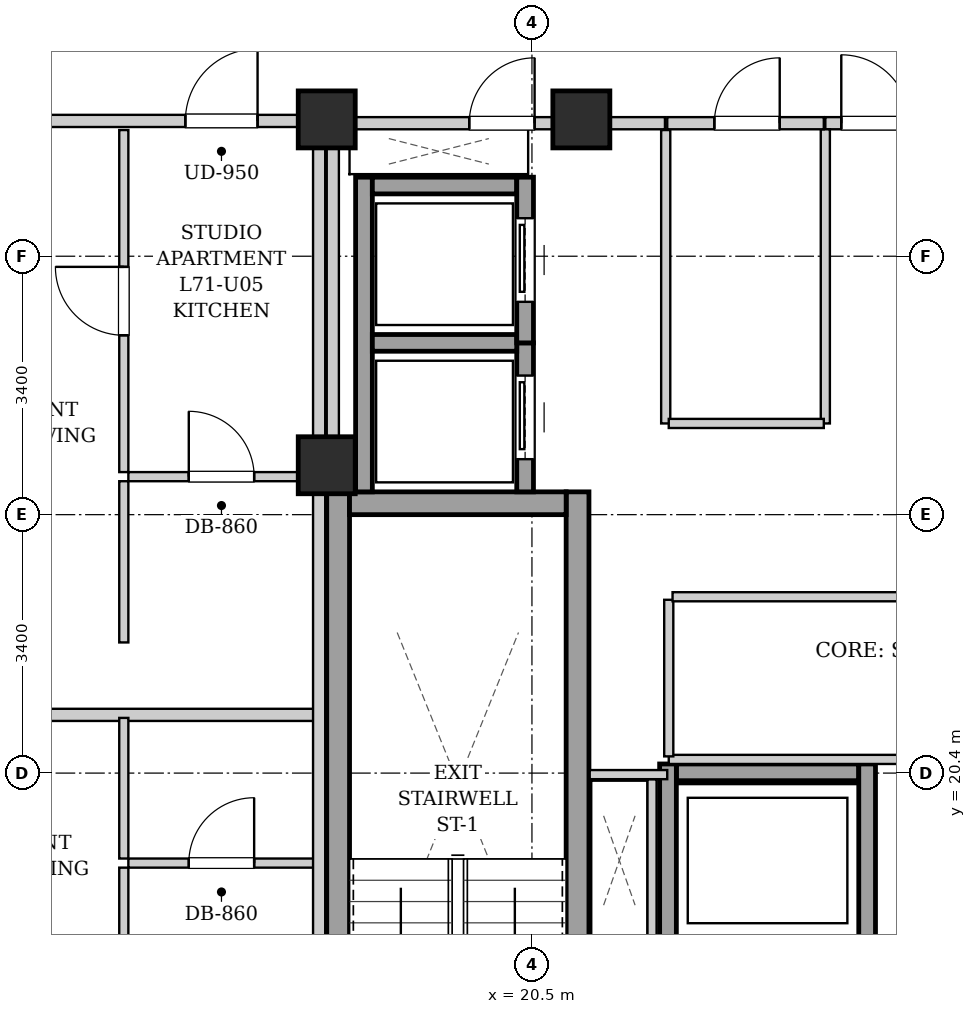
"""IFC4 building model, lengths in metres.
Left out: names, types, materials, properties, quantities, classifications, styles, units other than length and angle.
Written with IfcOpenShell. Run it as: python <this file> out.ifc"""

import sys

from ifc_helpers import new_model, si_unit, direction, frame, frame_2d, origin, origin_2d, place, context, subcontext, project, spatial, rectangle, extrude, element, fill, save


model = new_model("IFC4")
c1 = context("Model", 3, precision=1e-05, world=origin(), true_north=direction((0.0, 1.0)))
c2 = subcontext(c1, "Body", "Model", "MODEL_VIEW")
j1 = project(units=[si_unit("LENGTHUNIT", "METRE"), si_unit("PLANEANGLEUNIT", "RADIAN")], contexts=[c1])
p1 = place(None, origin())
s1 = spatial("IfcSite", under=j1, at=p1, CompositionType="ELEMENT")
p2 = place(p1, origin())
s2 = spatial("IfcBuilding", under=s1, at=p2, CompositionType="ELEMENT")
p3 = place(p2, frame((0.0, 0.0, 244.5)))
s3 = spatial("IfcBuildingStorey", under=s2, at=p3, CompositionType="ELEMENT", Elevation=244.5)
for number, where, z_axis, x_axis in (
    (1, (17.8, 29.0, 0.0), (0.0, 0.0, 1.0), (1.0, 0.0, 0.0)),
    (2, (21.15, 29.0, 0.0), (0.0, 0.0, 1.0), (1.0, 0.0, 0.0)),
    (3, (17.8, 24.45, 0.0), (0.0, 0.0, 1.0), (1.0, 0.0, 0.0)),
):
    element("IfcColumn", number, at=place(p3, frame(where, z_axis=z_axis, x_axis=x_axis)), inside=s3, PredefinedType="COLUMN", context=c2, shape_type="SweptSolid", body=[
        extrude(rectangle(XDim=0.75, YDim=0.75, at=origin_2d()), origin(), (0.0, 0.0, 1.0), 3.4),
    ])
for number, where, z_axis, x_axis in (
    (4, (17.95, 15.1, 0.0), (0.0, 0.0, 1.0), (0.0, 1.0, 0.0)),
    (5, (21.1, 15.1, 0.0), (0.0, 0.0, 1.0), (0.0, 1.0, 0.0)),
):
    element("IfcWall", number, at=place(p3, frame(where, z_axis=z_axis, x_axis=x_axis)), inside=s3, PredefinedType="SHEAR", context=c2, shape_type="SweptSolid", body=[
        extrude(rectangle(XDim=9.0, YDim=0.3, at=frame_2d((4.5, 0.0))), origin(), (0.0, 0.0, 1.0), 3.14),
    ])
p4 = place(p3, frame((18.1, 23.95, 0.0), z_axis=(0.0, 0.0, 1.0), x_axis=(1.0, 0.0, 0.0)))
e6 = element("IfcWall", 6, at=p4, inside=s3, PredefinedType="SHEAR", context=c2, shape_type="SweptSolid", body=[
    extrude(rectangle(XDim=2.85, YDim=0.3, at=frame_2d((1.425, 0.0))), origin(), (0.0, 0.0, 1.0), 3.14),
])
p5 = place(p3, frame((18.29, 24.1, 0.0), z_axis=(0.0, 0.0, 1.0), x_axis=(0.0, 1.0, 0.0)))
e7 = element("IfcWall", 7, at=p5, inside=s3, PredefinedType="SHEAR", context=c2, shape_type="SweptSolid", body=[
    extrude(rectangle(XDim=4.14, YDim=0.22, at=frame_2d((2.07, 0.0))), origin(), (0.0, 0.0, 1.0), 3.14),
])
p6 = place(p3, frame((20.41, 24.1, 0.0), z_axis=(0.0, 0.0, 1.0), x_axis=(0.0, 1.0, 0.0)))
e8 = element("IfcWall", 8, at=p6, inside=s3, PredefinedType="SHEAR", context=c2, shape_type="SweptSolid", body=[
    extrude(rectangle(XDim=1.96, YDim=0.22, at=frame_2d((0.98, 0.0))), origin(), (0.0, 0.0, 1.0), 3.14),
])
p7 = place(p6, frame((0.43, 0.0, 0.0)))
e9 = element("IfcOpeningElement", 9, at=p7, cuts=e8, PredefinedType="OPENING", context=c2, shape_type="SweptSolid", body=[
    extrude(rectangle(XDim=1.1, YDim=2.15, at=frame_2d((0.55, 1.075))), frame((0.0, 0.12, 0.0), z_axis=(0.0, -1.0, 0.0), x_axis=(1.0, 0.0, 0.0)), (0.0, 0.0, 1.0), 0.24),
])
for number, where, z_axis, x_axis in (
    (10, (18.4, 26.06, 0.0), (0.0, 0.0, 1.0), (1.0, 0.0, 0.0)),
    (11, (18.4, 28.13, 0.0), (0.0, 0.0, 1.0), (1.0, 0.0, 0.0)),
):
    element("IfcWall", number, at=place(p3, frame(where, z_axis=z_axis, x_axis=x_axis)), inside=s3, PredefinedType="SHEAR", context=c2, shape_type="SweptSolid", body=[
        extrude(rectangle(XDim=1.9, YDim=0.22, at=frame_2d((0.95, 0.0))), origin(), (0.0, 0.0, 1.0), 3.14),
    ])
p8 = place(p3, frame((20.41, 26.06, 0.0), z_axis=(0.0, 0.0, 1.0), x_axis=(0.0, 1.0, 0.0)))
e12 = element("IfcWall", 12, at=p8, inside=s3, PredefinedType="SHEAR", context=c2, shape_type="SweptSolid", body=[
    extrude(rectangle(XDim=2.18, YDim=0.22, at=frame_2d((1.09, 0.0))), origin(), (0.0, 0.0, 1.0), 3.14),
])
p9 = place(p8, frame((0.54, 0.0, 0.0)))
e13 = element("IfcOpeningElement", 13, at=p9, cuts=e12, PredefinedType="OPENING", context=c2, shape_type="SweptSolid", body=[
    extrude(rectangle(XDim=1.1, YDim=2.15, at=frame_2d((0.55, 1.075))), frame((0.0, 0.12, 0.0), z_axis=(0.0, -1.0, 0.0), x_axis=(1.0, 0.0, 0.0)), (0.0, 0.0, 1.0), 0.24),
])
p10 = place(p3, frame((22.4, 20.41, 0.0), z_axis=(0.0, 0.0, 1.0), x_axis=(1.0, 0.0, 0.0)))
e14 = element("IfcWall", 14, at=p10, inside=s3, PredefinedType="SHEAR", context=c2, shape_type="SweptSolid", body=[
    extrude(rectangle(XDim=2.4, YDim=0.22, at=frame_2d((1.2, 0.0))), origin(), (0.0, 0.0, 1.0), 3.14),
])
for number, where, z_axis, x_axis in (
    (15, (22.29, 17.98, 0.0), (0.0, 0.0, 1.0), (0.0, 1.0, 0.0)),
    (16, (24.91, 17.98, 0.0), (0.0, 0.0, 1.0), (0.0, 1.0, 0.0)),
):
    element("IfcWall", number, at=place(p3, frame(where, z_axis=z_axis, x_axis=x_axis)), inside=s3, PredefinedType="SHEAR", context=c2, shape_type="SweptSolid", body=[
        extrude(rectangle(XDim=2.54, YDim=0.22, at=frame_2d((1.27, 0.0))), origin(), (0.0, 0.0, 1.0), 3.14),
    ])
p11 = place(p3, frame((17.88, 24.12, 0.0), z_axis=(0.0, 0.0, 1.0), x_axis=(0.0, 1.0, 0.0)))
e17 = element("IfcWall", 17, at=p11, inside=s3, PredefinedType="PARTITIONING", context=c2, shape_type="SweptSolid", body=[
    extrude(rectangle(XDim=4.76, YDim=0.16, at=frame_2d((2.38, 0.0))), origin(), (0.0, 0.0, 1.0), 3.14),
])
p12 = place(p3, frame((24.36, 28.95, 0.0), z_axis=(0.0, 0.0, 1.0), x_axis=(1.0, 0.0, 0.0)))
e18 = element("IfcWall", 18, at=p12, inside=s3, PredefinedType="PARTITIONING", context=c2, shape_type="SweptSolid", body=[
    extrude(rectangle(XDim=1.32, YDim=0.16, at=frame_2d((0.66, 0.0))), origin(), (0.0, 0.0, 1.0), 2.668),
])
p13 = place(p12, frame((0.21, 0.0, 0.0)))
e19 = element("IfcOpeningElement", 19, at=p13, cuts=e18, PredefinedType="OPENING", context=c2, shape_type="SweptSolid", body=[
    extrude(rectangle(XDim=0.9, YDim=2.05, at=frame_2d((0.45, 1.025))), frame((0.0, 0.09, 0.0), z_axis=(0.0, -1.0, 0.0), x_axis=(1.0, 0.0, 0.0)), (0.0, 0.0, 1.0), 0.18),
])
p14 = place(p3, frame((17.96, 28.95, 0.0), z_axis=(0.0, 0.0, 1.0), x_axis=(1.0, 0.0, 0.0)))
e20 = element("IfcWall", 20, at=p14, inside=s3, PredefinedType="PARTITIONING", context=c2, shape_type="SweptSolid", body=[
    extrude(rectangle(XDim=4.29, YDim=0.16, at=frame_2d((2.145, 0.0))), origin(), (0.0, 0.0, 1.0), 2.668),
])
p15 = place(p14, frame((1.715, 0.0, 0.0)))
e21 = element("IfcOpeningElement", 21, at=p15, cuts=e20, PredefinedType="OPENING", context=c2, shape_type="SweptSolid", body=[
    extrude(rectangle(XDim=0.86, YDim=2.05, at=frame_2d((0.43, 1.025))), frame((0.0, 0.09, 0.0), z_axis=(0.0, -1.0, 0.0), x_axis=(1.0, 0.0, 0.0)), (0.0, 0.0, 1.0), 0.18),
])
p16 = place(p3, frame((22.08, 18.2, 0.0), z_axis=(0.0, 0.0, 1.0), x_axis=(0.0, 1.0, 0.0)))
e22 = element("IfcWall", 22, at=p16, inside=s3, PredefinedType="PARTITIONING", context=c2, shape_type="SweptSolid", body=[
    extrude(rectangle(XDim=2.12, YDim=0.12, at=frame_2d((1.06, 0.0))), origin(), (0.0, 0.0, 1.0), 3.14),
])
p17 = place(p3, frame((22.28, 20.38, 0.0), z_axis=(0.0, 0.0, 1.0), x_axis=(-1.0, 0.0, 0.0)))
e23 = element("IfcWall", 23, at=p17, inside=s3, PredefinedType="PARTITIONING", context=c2, shape_type="SweptSolid", body=[
    extrude(rectangle(XDim=1.02, YDim=0.12, at=frame_2d((0.51, 0.0))), origin(), (0.0, 0.0, 1.0), 3.14),
])
p18 = place(p3, frame((24.36, 25.0, 0.0), z_axis=(0.0, 0.0, 1.0), x_axis=(0.0, 1.0, 0.0)))
e24 = element("IfcWall", 24, at=p18, inside=s3, PredefinedType="PARTITIONING", context=c2, shape_type="SweptSolid", body=[
    extrude(rectangle(XDim=3.87, YDim=0.12, at=frame_2d((1.935, 0.0))), origin(), (0.0, 0.0, 1.0), 3.14),
])
p19 = place(p3, frame((22.26, 25.0, 0.0), z_axis=(0.0, 0.0, 1.0), x_axis=(0.0, 1.0, 0.0)))
e25 = element("IfcWall", 25, at=p19, inside=s3, PredefinedType="PARTITIONING", context=c2, shape_type="SweptSolid", body=[
    extrude(rectangle(XDim=3.86, YDim=0.12, at=frame_2d((1.93, 0.0))), origin(), (0.0, 0.0, 1.0), 3.14),
])
p20 = place(p3, frame((22.3, 25.0, 0.0), z_axis=(0.0, 0.0, 1.0), x_axis=(1.0, 0.0, 0.0)))
e26 = element("IfcWall", 26, at=p20, inside=s3, PredefinedType="PARTITIONING", context=c2, shape_type="SweptSolid", body=[
    extrude(rectangle(XDim=2.04, YDim=0.12, at=frame_2d((1.02, 0.0))), origin(), (0.0, 0.0, 1.0), 3.14),
])
p21 = place(p3, frame((22.28, 28.95, 0.0), z_axis=(0.0, 0.0, 1.0), x_axis=(1.0, 0.0, 0.0)))
e27 = element("IfcWall", 27, at=p21, inside=s3, PredefinedType="PARTITIONING", context=c2, shape_type="SweptSolid", body=[
    extrude(rectangle(XDim=2.06, YDim=0.16, at=frame_2d((1.03, 0.0))), origin(), (0.0, 0.0, 1.0), 2.668),
])
p22 = place(p21, frame((0.62, 0.0, 0.0)))
e28 = element("IfcOpeningElement", 28, at=p22, cuts=e27, PredefinedType="OPENING", context=c2, shape_type="SweptSolid", body=[
    extrude(rectangle(XDim=0.86, YDim=2.05, at=frame_2d((0.43, 1.025))), frame((0.0, 0.09, 0.0), z_axis=(0.0, -1.0, 0.0), x_axis=(1.0, 0.0, 0.0)), (0.0, 0.0, 1.0), 0.18),
])
p23 = place(p3, frame((22.3, 20.58, 0.0), z_axis=(0.0, 0.0, 1.0), x_axis=(1.0, 0.0, 0.0)))
e29 = element("IfcWall", 29, at=p23, inside=s3, PredefinedType="PARTITIONING", context=c2, shape_type="SweptSolid", body=[
    extrude(rectangle(XDim=7.35, YDim=0.12, at=frame_2d((3.675, 0.0))), origin(), (0.0, 0.0, 1.0), 3.14),
])
p24 = place(p3, frame((22.3, 20.62, 0.0), z_axis=(0.0, 0.0, 1.0), x_axis=(0.0, 1.0, 0.0)))
e30 = element("IfcWall", 30, at=p24, inside=s3, PredefinedType="PARTITIONING", context=c2, shape_type="SweptSolid", body=[
    extrude(rectangle(XDim=2.06, YDim=0.12, at=frame_2d((1.03, 0.0))), origin(), (0.0, 0.0, 1.0), 3.14),
])
p25 = place(p3, frame((22.35, 22.72, 0.0), z_axis=(0.0, 0.0, 1.0), x_axis=(1.0, 0.0, 0.0)))
e31 = element("IfcWall", 31, at=p25, inside=s3, PredefinedType="PARTITIONING", context=c2, shape_type="SweptSolid", body=[
    extrude(rectangle(XDim=7.27, YDim=0.12, at=frame_2d((3.635, 0.0))), origin(), (0.0, 0.0, 1.0), 3.14),
])
p26 = place(p25, frame((3.25, 0.0, 0.0)))
e32 = element("IfcOpeningElement", 32, at=p26, cuts=e31, PredefinedType="OPENING", context=c2, shape_type="SweptSolid", body=[
    extrude(rectangle(XDim=0.9, YDim=2.05, at=frame_2d((0.45, 1.025))), frame((0.0, 0.07, 0.0), z_axis=(0.0, -1.0, 0.0), x_axis=(1.0, 0.0, 0.0)), (0.0, 0.0, 1.0), 0.14),
])
p27 = place(p3, frame((10.88, 21.166, 0.0), z_axis=(0.0, 0.0, 1.0), x_axis=(1.0, 0.0, 0.0)))
e33 = element("IfcWall", 33, at=p27, inside=s3, PredefinedType="PARTITIONING", context=c2, shape_type="SweptSolid", body=[
    extrude(rectangle(XDim=6.76, YDim=0.16, at=frame_2d((3.38, 0.0))), origin(), (0.0, 0.0, 1.0), 3.14),
])
p28 = place(p3, frame((15.19, 19.216, 0.0), z_axis=(0.0, 0.0, 1.0), x_axis=(1.0, 0.0, 0.0)))
e34 = element("IfcWall", 34, at=p28, inside=s3, PredefinedType="PARTITIONING", context=c2, shape_type="SweptSolid", body=[
    extrude(rectangle(XDim=2.45, YDim=0.12, at=frame_2d((1.225, 0.0))), origin(), (0.0, 0.0, 1.0), 3.14),
])
p29 = place(p28, frame((0.795, 0.0, 0.0)))
e35 = element("IfcOpeningElement", 35, at=p29, cuts=e34, PredefinedType="OPENING", context=c2, shape_type="SweptSolid", body=[
    extrude(rectangle(XDim=0.86, YDim=2.05, at=frame_2d((0.43, 1.025))), frame((0.0, 0.07, 0.0), z_axis=(0.0, -1.0, 0.0), x_axis=(1.0, 0.0, 0.0)), (0.0, 0.0, 1.0), 0.14),
])
p30 = place(p3, frame((15.13, 19.276, 0.0), z_axis=(0.0, 0.0, 1.0), x_axis=(0.0, 1.0, 0.0)))
e36 = element("IfcWall", 36, at=p30, inside=s3, PredefinedType="PARTITIONING", context=c2, shape_type="SweptSolid", body=[
    extrude(rectangle(XDim=1.85, YDim=0.12, at=frame_2d((0.925, 0.0))), origin(), (0.0, 0.0, 1.0), 3.14),
])
p31 = place(p3, frame((15.13, 15.21, 0.0), z_axis=(0.0, 0.0, 1.0), x_axis=(0.0, 1.0, 0.0)))
e37 = element("IfcWall", 37, at=p31, inside=s3, PredefinedType="PARTITIONING", context=c2, shape_type="SweptSolid", body=[
    extrude(rectangle(XDim=3.946, YDim=0.12, at=frame_2d((1.973, 0.0))), origin(), (0.0, 0.0, 1.0), 3.14),
])
p32 = place(p31, frame((1.523, 0.0, 0.0)))
e38 = element("IfcOpeningElement", 38, at=p32, cuts=e37, PredefinedType="OPENING", context=c2, shape_type="SweptSolid", body=[
    extrude(rectangle(XDim=0.9, YDim=2.05, at=frame_2d((0.45, 1.025))), frame((0.0, 0.07, 0.0), z_axis=(0.0, -1.0, 0.0), x_axis=(1.0, 0.0, 0.0)), (0.0, 0.0, 1.0), 0.14),
])
p33 = place(p3, frame((10.88, 28.98, 0.0), z_axis=(0.0, 0.0, 1.0), x_axis=(1.0, 0.0, 0.0)))
e39 = element("IfcWall", 39, at=p33, inside=s3, PredefinedType="PARTITIONING", context=c2, shape_type="SweptSolid", body=[
    extrude(rectangle(XDim=6.88, YDim=0.16, at=frame_2d((3.44, 0.0))), origin(), (0.0, 0.0, 1.0), 2.668),
])
p34 = place(p33, frame((5.06, 0.0, 0.0)))
e40 = element("IfcOpeningElement", 40, at=p34, cuts=e39, PredefinedType="OPENING", context=c2, shape_type="SweptSolid", body=[
    extrude(rectangle(XDim=0.95, YDim=2.1, at=frame_2d((0.475, 1.05))), frame((0.0, 0.09, 0.0), z_axis=(0.0, -1.0, 0.0), x_axis=(1.0, 0.0, 0.0)), (0.0, 0.0, 1.0), 0.18),
])
p35 = place(p3, frame((15.19, 24.3, 0.0), z_axis=(0.0, 0.0, 1.0), x_axis=(1.0, 0.0, 0.0)))
e41 = element("IfcWall", 41, at=p35, inside=s3, PredefinedType="PARTITIONING", context=c2, shape_type="SweptSolid", body=[
    extrude(rectangle(XDim=2.45, YDim=0.12, at=frame_2d((1.225, 0.0))), origin(), (0.0, 0.0, 1.0), 3.14),
])
p36 = place(p35, frame((0.795, 0.0, 0.0)))
e42 = element("IfcOpeningElement", 42, at=p36, cuts=e41, PredefinedType="OPENING", context=c2, shape_type="SweptSolid", body=[
    extrude(rectangle(XDim=0.86, YDim=2.05, at=frame_2d((0.43, 1.025))), frame((0.0, 0.07, 0.0), z_axis=(0.0, -1.0, 0.0), x_axis=(1.0, 0.0, 0.0)), (0.0, 0.0, 1.0), 0.14),
])
p37 = place(p3, frame((15.13, 22.119, 0.0), z_axis=(0.0, 0.0, 1.0), x_axis=(0.0, 1.0, 0.0)))
e43 = element("IfcWall", 43, at=p37, inside=s3, PredefinedType="PARTITIONING", context=c2, shape_type="SweptSolid", body=[
    extrude(rectangle(XDim=2.121, YDim=0.12, at=frame_2d((1.061, 0.0))), origin(), (0.0, 0.0, 1.0), 3.14),
])
p38 = place(p3, frame((15.13, 24.36, 0.0), z_axis=(0.0, 0.0, 1.0), x_axis=(0.0, 1.0, 0.0)))
e44 = element("IfcWall", 44, at=p38, inside=s3, PredefinedType="PARTITIONING", context=c2, shape_type="SweptSolid", body=[
    extrude(rectangle(XDim=4.5, YDim=0.12, at=frame_2d((2.25, 0.0))), origin(), (0.0, 0.0, 1.0), 3.14),
])
p39 = place(p38, frame((1.8, 0.0, 0.0)))
e45 = element("IfcOpeningElement", 45, at=p39, cuts=e44, PredefinedType="OPENING", context=c2, shape_type="SweptSolid", body=[
    extrude(rectangle(XDim=0.9, YDim=2.05, at=frame_2d((0.45, 1.025))), frame((0.0, 0.07, 0.0), z_axis=(0.0, -1.0, 0.0), x_axis=(1.0, 0.0, 0.0)), (0.0, 0.0, 1.0), 0.14),
])
p40 = place(p3, frame((17.7, 15.02, 0.0), z_axis=(0.0, 0.0, 1.0), x_axis=(0.0, 1.0, 0.0)))
e46 = element("IfcWall", 46, at=p40, inside=s3, PredefinedType="PARTITIONING", context=c2, shape_type="SweptSolid", body=[
    extrude(rectangle(XDim=13.98, YDim=0.16, at=frame_2d((6.99, 0.0))), origin(), (0.0, 0.0, 1.0), 3.14),
])
p41 = place(p7, origin())
e47 = element("IfcDoor", 47, at=p41, inside=s3, OperationType="SLIDING_TO_LEFT", PredefinedType="DOOR", context=c2, shape_type="SweptSolid", body=[
    extrude(rectangle(XDim=1.1, YDim=2.15, at=frame_2d((0.55, 1.075))), frame((0.0, 0.025, 0.0), z_axis=(0.0, -1.0, 0.0), x_axis=(1.0, 0.0, 0.0)), (0.0, 0.0, 1.0), 0.05),
])
fill(e9, e47)
p42 = place(p9, origin())
e48 = element("IfcDoor", 48, at=p42, inside=s3, OperationType="SLIDING_TO_LEFT", PredefinedType="DOOR", context=c2, shape_type="SweptSolid", body=[
    extrude(rectangle(XDim=1.1, YDim=2.15, at=frame_2d((0.55, 1.075))), frame((0.0, 0.025, 0.0), z_axis=(0.0, -1.0, 0.0), x_axis=(1.0, 0.0, 0.0)), (0.0, 0.0, 1.0), 0.05),
])
fill(e13, e48)
p43 = place(p13, origin())
e49 = element("IfcDoor", 49, at=p43, inside=s3, OperationType="SINGLE_SWING_LEFT", PredefinedType="DOOR", context=c2, shape_type="SweptSolid", body=[
    extrude(rectangle(XDim=0.9, YDim=2.05, at=frame_2d((0.45, 1.025))), frame((0.0, 0.025, 0.0), z_axis=(0.0, -1.0, 0.0), x_axis=(1.0, 0.0, 0.0)), (0.0, 0.0, 1.0), 0.05),
])
fill(e19, e49)
p44 = place(p15, origin())
e50 = element("IfcDoor", 50, at=p44, inside=s3, OperationType="SINGLE_SWING_RIGHT", PredefinedType="DOOR", context=c2, shape_type="SweptSolid", body=[
    extrude(rectangle(XDim=0.86, YDim=2.05, at=frame_2d((0.43, 1.025))), frame((0.0, 0.025, 0.0), z_axis=(0.0, -1.0, 0.0), x_axis=(1.0, 0.0, 0.0)), (0.0, 0.0, 1.0), 0.05),
])
fill(e21, e50)
p45 = place(p22, origin())
e51 = element("IfcDoor", 51, at=p45, inside=s3, OperationType="SINGLE_SWING_RIGHT", PredefinedType="DOOR", context=c2, shape_type="SweptSolid", body=[
    extrude(rectangle(XDim=0.86, YDim=2.05, at=frame_2d((0.43, 1.025))), frame((0.0, 0.025, 0.0), z_axis=(0.0, -1.0, 0.0), x_axis=(1.0, 0.0, 0.0)), (0.0, 0.0, 1.0), 0.05),
])
fill(e28, e51)
p46 = place(p29, origin())
e52 = element("IfcDoor", 52, at=p46, inside=s3, OperationType="SINGLE_SWING_RIGHT", PredefinedType="DOOR", context=c2, shape_type="SweptSolid", body=[
    extrude(rectangle(XDim=0.86, YDim=2.05, at=frame_2d((0.43, 1.025))), frame((0.0, 0.025, 0.0), z_axis=(0.0, -1.0, 0.0), x_axis=(1.0, 0.0, 0.0)), (0.0, 0.0, 1.0), 0.05),
])
fill(e35, e52)
p47 = place(p34, origin())
e53 = element("IfcDoor", 53, at=p47, inside=s3, OperationType="SINGLE_SWING_RIGHT", PredefinedType="DOOR", context=c2, shape_type="SweptSolid", body=[
    extrude(rectangle(XDim=0.95, YDim=2.1, at=frame_2d((0.475, 1.05))), frame((0.0, 0.025, 0.0), z_axis=(0.0, -1.0, 0.0), x_axis=(1.0, 0.0, 0.0)), (0.0, 0.0, 1.0), 0.05),
])
fill(e40, e53)
p48 = place(p36, origin())
e54 = element("IfcDoor", 54, at=p48, inside=s3, OperationType="SINGLE_SWING_LEFT", PredefinedType="DOOR", context=c2, shape_type="SweptSolid", body=[
    extrude(rectangle(XDim=0.86, YDim=2.05, at=frame_2d((0.43, 1.025))), frame((0.0, 0.025, 0.0), z_axis=(0.0, -1.0, 0.0), x_axis=(1.0, 0.0, 0.0)), (0.0, 0.0, 1.0), 0.05),
])
fill(e42, e54)
p49 = place(p39, origin())
e55 = element("IfcDoor", 55, at=p49, inside=s3, OperationType="SINGLE_SWING_RIGHT", PredefinedType="DOOR", context=c2, shape_type="SweptSolid", body=[
    extrude(rectangle(XDim=0.9, YDim=2.05, at=frame_2d((0.45, 1.025))), frame((0.0, 0.025, 0.0), z_axis=(0.0, -1.0, 0.0), x_axis=(1.0, 0.0, 0.0)), (0.0, 0.0, 1.0), 0.05),
])
fill(e45, e55)
save(model, sys.argv[1])
